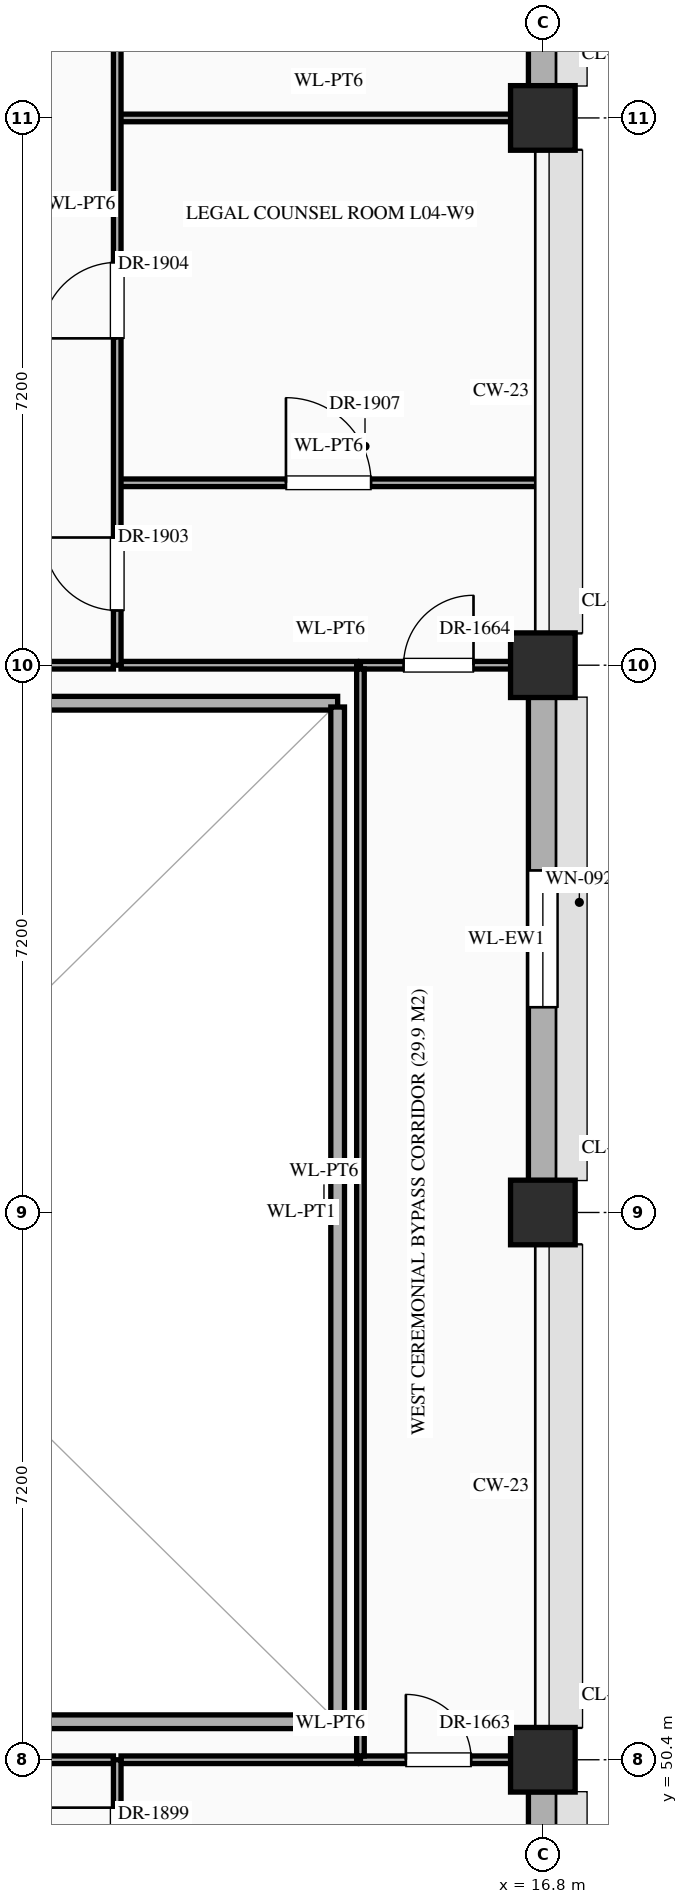
"""IFC4 building model, lengths in metres.
Left out: names, types, materials, properties, quantities, classifications, styles, units other than length and angle.
Written with IfcOpenShell. Run it as: python <this file> out.ifc"""

import sys

from ifc_helpers import new_model, si_unit, direction, frame, frame_2d, origin, origin_2d, place, context, subcontext, project, spatial, rectangle, extrude, element, fill, save


model = new_model("IFC4")
c1 = context("Model", 3, precision=1e-05, world=origin(), true_north=direction((0.0, 1.0)))
c2 = subcontext(c1, "Body", "Model", "MODEL_VIEW")
j1 = project(units=[si_unit("LENGTHUNIT", "METRE"), si_unit("PLANEANGLEUNIT", "RADIAN")], contexts=[c1])
p1 = place(None, origin())
s1 = spatial("IfcSite", under=j1, at=p1, CompositionType="ELEMENT")
p2 = place(p1, origin())
s2 = spatial("IfcBuilding", under=s1, at=p2, CompositionType="ELEMENT")
p3 = place(p2, frame((0.0, 0.0, 16.2)))
s3 = spatial("IfcBuildingStorey", under=s2, at=p3, CompositionType="ELEMENT", Elevation=16.2)
for number, where, z_axis, x_axis in (
    (1, (16.8, 50.4, 0.0), (0.0, 0.0, 1.0), (1.0, 0.0, 0.0)),
    (2, (16.8, 57.6, 0.0), (0.0, 0.0, 1.0), (1.0, 0.0, 0.0)),
    (3, (16.8, 64.8, 0.0), (0.0, 0.0, 1.0), (1.0, 0.0, 0.0)),
    (4, (16.8, 72.0, 0.0), (0.0, 0.0, 1.0), (1.0, 0.0, 0.0)),
):
    element("IfcColumn", number, at=place(p3, frame(where, z_axis=z_axis, x_axis=x_axis)), inside=s3, PredefinedType="COLUMN", context=c2, shape_type="SweptSolid", body=[
        extrude(rectangle(XDim=0.85, YDim=0.85, at=origin_2d()), origin(), (0.0, 0.0, 1.0), 5.4),
    ])
p4 = place(p3, frame((16.8, 43.62, 0.0), z_axis=(0.0, 0.0, 1.0), x_axis=(0.0, 1.0, 0.0)))
e5 = element("IfcWall", 5, at=p4, inside=s3, PredefinedType="STANDARD", context=c2, shape_type="SweptSolid", body=[
    extrude(rectangle(XDim=6.36, YDim=0.38, at=frame_2d((3.18, 0.0))), origin(), (0.0, 0.0, 1.0), 4.55),
])
p5 = place(p4, frame((2.405, 0.0, 0.85)))
e6 = element("IfcOpeningElement", 6, at=p5, cuts=e5, PredefinedType="OPENING", context=c2, shape_type="SweptSolid", body=[
    extrude(rectangle(XDim=1.55, YDim=1.92, at=frame_2d((0.775, 0.96))), frame((0.0, 0.202, 0.0), z_axis=(0.0, -1.0, 0.0), x_axis=(1.0, 0.0, 0.0)), (0.0, 0.0, 1.0), 0.404),
])
p6 = place(p3, frame((16.8, 58.02, 0.0), z_axis=(0.0, 0.0, 1.0), x_axis=(0.0, 1.0, 0.0)))
e7 = element("IfcWall", 7, at=p6, inside=s3, PredefinedType="STANDARD", context=c2, shape_type="SweptSolid", body=[
    extrude(rectangle(XDim=6.36, YDim=0.38, at=frame_2d((3.18, 0.0))), origin(), (0.0, 0.0, 1.0), 4.55),
])
p7 = place(p6, frame((2.28, 0.0, 0.85)))
e8 = element("IfcOpeningElement", 8, at=p7, cuts=e7, PredefinedType="OPENING", context=c2, shape_type="SweptSolid", body=[
    extrude(rectangle(XDim=1.8, YDim=1.2, at=frame_2d((0.9, 0.6))), frame((0.0, 0.202, 0.0), z_axis=(0.0, -1.0, 0.0), x_axis=(1.0, 0.0, 0.0)), (0.0, 0.0, 1.0), 0.404),
])
p8 = place(p3, frame((16.8, 72.42, 0.0), z_axis=(0.0, 0.0, 1.0), x_axis=(0.0, 1.0, 0.0)))
e9 = element("IfcWall", 9, at=p8, inside=s3, PredefinedType="STANDARD", context=c2, shape_type="SweptSolid", body=[
    extrude(rectangle(XDim=6.36, YDim=0.38, at=frame_2d((3.18, 0.0))), origin(), (0.0, 0.0, 1.0), 4.55),
])
p9 = place(p8, frame((2.28, 0.0, 0.85)))
e10 = element("IfcOpeningElement", 10, at=p9, cuts=e9, PredefinedType="OPENING", context=c2, shape_type="SweptSolid", body=[
    extrude(rectangle(XDim=1.8, YDim=1.56, at=frame_2d((0.9, 0.78))), frame((0.0, 0.202, 0.0), z_axis=(0.0, -1.0, 0.0), x_axis=(1.0, 0.0, 0.0)), (0.0, 0.0, 1.0), 0.404),
])
p10 = place(p3, frame((8.45, 50.4, 0.0), z_axis=(0.0, 0.0, 1.0), x_axis=(1.0, 0.0, 0.0)))
e11 = element("IfcWall", 11, at=p10, inside=s3, PredefinedType="STANDARD", context=c2, shape_type="SweptSolid", body=[
    extrude(rectangle(XDim=2.7, YDim=0.1, at=frame_2d((1.35, 0.0))), origin(), (0.0, 0.0, 1.0), 4.15),
])
p11 = place(p3, frame((11.25, 50.4, 0.0), z_axis=(0.0, 0.0, 1.0), x_axis=(1.0, 0.0, 0.0)))
e12 = element("IfcWall", 12, at=p11, inside=s3, PredefinedType="STANDARD", context=c2, shape_type="SweptSolid", body=[
    extrude(rectangle(XDim=3.1, YDim=0.1, at=frame_2d((1.55, 0.0))), origin(), (0.0, 0.0, 1.0), 4.15),
])
p12 = place(p3, frame((14.4, 50.4, 0.0), z_axis=(0.0, 0.0, 1.0), x_axis=(1.0, 0.0, 0.0)))
e13 = element("IfcWall", 13, at=p12, inside=s3, PredefinedType="STANDARD", context=c2, shape_type="SweptSolid", body=[
    extrude(rectangle(XDim=2.36, YDim=0.1, at=frame_2d((1.18, 0.0))), origin(), (0.0, 0.0, 1.0), 4.15),
])
p13 = place(p12, frame((0.597, 0.0, 0.0)))
e14 = element("IfcOpeningElement", 14, at=p13, cuts=e13, PredefinedType="OPENING", context=c2, shape_type="SweptSolid", body=[
    extrude(rectangle(XDim=0.86, YDim=2.1, at=frame_2d((0.43, 1.05))), frame((0.0, 0.062, 0.0), z_axis=(0.0, -1.0, 0.0), x_axis=(1.0, 0.0, 0.0)), (0.0, 0.0, 1.0), 0.124),
])
for number, where, z_axis, x_axis in (
    (15, (0.5, 50.9, 0.0), (0.0, 0.0, 1.0), (1.0, 0.0, 0.0)),
    (16, (0.5, 64.3, 0.0), (0.0, 0.0, 1.0), (1.0, 0.0, 0.0)),
):
    element("IfcWall", number, at=place(p3, frame(where, z_axis=z_axis, x_axis=x_axis)), inside=s3, PredefinedType="STANDARD", context=c2, shape_type="SweptSolid", body=[
        extrude(rectangle(XDim=13.6, YDim=0.18, at=frame_2d((6.8, 0.0))), origin(), (0.0, 0.0, 1.0), 5.2),
    ])
p14 = place(p3, frame((8.45, 64.8, 0.0), z_axis=(0.0, 0.0, 1.0), x_axis=(1.0, 0.0, 0.0)))
e17 = element("IfcWall", 17, at=p14, inside=s3, PredefinedType="STANDARD", context=c2, shape_type="SweptSolid", body=[
    extrude(rectangle(XDim=2.7, YDim=0.1, at=frame_2d((1.35, 0.0))), origin(), (0.0, 0.0, 1.0), 4.15),
])
p15 = place(p3, frame((11.25, 64.8, 0.0), z_axis=(0.0, 0.0, 1.0), x_axis=(1.0, 0.0, 0.0)))
e18 = element("IfcWall", 18, at=p15, inside=s3, PredefinedType="STANDARD", context=c2, shape_type="SweptSolid", body=[
    extrude(rectangle(XDim=3.1, YDim=0.1, at=frame_2d((1.55, 0.0))), origin(), (0.0, 0.0, 1.0), 4.15),
])
p16 = place(p3, frame((14.4, 64.8, 0.0), z_axis=(0.0, 0.0, 1.0), x_axis=(1.0, 0.0, 0.0)))
e19 = element("IfcWall", 19, at=p16, inside=s3, PredefinedType="STANDARD", context=c2, shape_type="SweptSolid", body=[
    extrude(rectangle(XDim=2.36, YDim=0.1, at=frame_2d((1.18, 0.0))), origin(), (0.0, 0.0, 1.0), 4.15),
])
p17 = place(p16, frame((0.567, 0.0, 0.0)))
e20 = element("IfcOpeningElement", 20, at=p17, cuts=e19, PredefinedType="OPENING", context=c2, shape_type="SweptSolid", body=[
    extrude(rectangle(XDim=0.92, YDim=2.15, at=frame_2d((0.46, 1.075))), frame((0.0, 0.062, 0.0), z_axis=(0.0, -1.0, 0.0), x_axis=(1.0, 0.0, 0.0)), (0.0, 0.0, 1.0), 0.124),
])
p18 = place(p3, frame((11.2, 67.2, 0.0), z_axis=(0.0, 0.0, 1.0), x_axis=(1.0, 0.0, 0.0)))
e21 = element("IfcWall", 21, at=p18, inside=s3, PredefinedType="STANDARD", context=c2, shape_type="SweptSolid", body=[
    extrude(rectangle(XDim=5.56, YDim=0.1, at=frame_2d((2.78, 0.0))), origin(), (0.0, 0.0, 1.0), 5.2),
])
p19 = place(p18, frame((2.22, 0.0, 0.0)))
e22 = element("IfcOpeningElement", 22, at=p19, cuts=e21, PredefinedType="OPENING", context=c2, shape_type="SweptSolid", body=[
    extrude(rectangle(XDim=1.12, YDim=2.25, at=frame_2d((0.56, 1.125))), frame((0.0, 0.062, 0.0), z_axis=(0.0, -1.0, 0.0), x_axis=(1.0, 0.0, 0.0)), (0.0, 0.0, 1.0), 0.124),
])
p20 = place(p3, frame((11.2, 72.0, 0.0), z_axis=(0.0, 0.0, 1.0), x_axis=(1.0, 0.0, 0.0)))
e23 = element("IfcWall", 23, at=p20, inside=s3, PredefinedType="STANDARD", context=c2, shape_type="SweptSolid", body=[
    extrude(rectangle(XDim=5.56, YDim=0.1, at=frame_2d((2.78, 0.0))), origin(), (0.0, 0.0, 1.0), 4.15),
])
p21 = place(p3, frame((11.2, 43.2, 0.0), z_axis=(0.0, 0.0, 1.0), x_axis=(0.0, 1.0, 0.0)))
e24 = element("IfcWall", 24, at=p21, inside=s3, PredefinedType="STANDARD", context=c2, shape_type="SweptSolid", body=[
    extrude(rectangle(XDim=7.2, YDim=0.1, at=frame_2d((3.6, 0.0))), origin(), (0.0, 0.0, 1.0), 5.2),
])
p22 = place(p21, frame((5.43, 0.0, 0.0)))
e25 = element("IfcOpeningElement", 25, at=p22, cuts=e24, PredefinedType="OPENING", context=c2, shape_type="SweptSolid", body=[
    extrude(rectangle(XDim=1.14, YDim=2.4, at=frame_2d((0.57, 1.2))), frame((0.0, 0.062, 0.0), z_axis=(0.0, -1.0, 0.0), x_axis=(1.0, 0.0, 0.0)), (0.0, 0.0, 1.0), 0.124),
])
p23 = place(p21, frame((1.95, 0.0, 0.0)))
e26 = element("IfcOpeningElement", 26, at=p23, cuts=e24, PredefinedType="OPENING", context=c2, shape_type="SweptSolid", body=[
    extrude(rectangle(XDim=0.9, YDim=2.15, at=frame_2d((0.45, 1.075))), frame((0.0, 0.062, 0.0), z_axis=(0.0, -1.0, 0.0), x_axis=(1.0, 0.0, 0.0)), (0.0, 0.0, 1.0), 0.124),
])
p24 = place(p3, frame((11.2, 64.8, 0.0), z_axis=(0.0, 0.0, 1.0), x_axis=(0.0, 1.0, 0.0)))
e27 = element("IfcWall", 27, at=p24, inside=s3, PredefinedType="STANDARD", context=c2, shape_type="SweptSolid", body=[
    extrude(rectangle(XDim=19.2, YDim=0.1, at=frame_2d((9.6, 0.0))), origin(), (0.0, 0.0, 1.0), 5.2),
])
p25 = place(p24, frame((16.16, 0.0, 0.0)))
e28 = element("IfcOpeningElement", 28, at=p25, cuts=e27, PredefinedType="OPENING", context=c2, shape_type="SweptSolid", body=[
    extrude(rectangle(XDim=1.28, YDim=2.35, at=frame_2d((0.64, 1.175))), frame((0.0, 0.062, 0.0), z_axis=(0.0, -1.0, 0.0), x_axis=(1.0, 0.0, 0.0)), (0.0, 0.0, 1.0), 0.124),
])
p26 = place(p24, frame((0.72, 0.0, 0.0)))
e29 = element("IfcOpeningElement", 29, at=p26, cuts=e27, PredefinedType="OPENING", context=c2, shape_type="SweptSolid", body=[
    extrude(rectangle(XDim=0.96, YDim=2.2, at=frame_2d((0.48, 1.1))), frame((0.0, 0.062, 0.0), z_axis=(0.0, -1.0, 0.0), x_axis=(1.0, 0.0, 0.0)), (0.0, 0.0, 1.0), 0.124),
])
p27 = place(p24, frame((4.3, 0.0, 0.0)))
e30 = element("IfcOpeningElement", 30, at=p27, cuts=e27, PredefinedType="OPENING", context=c2, shape_type="SweptSolid", body=[
    extrude(rectangle(XDim=1.0, YDim=2.25, at=frame_2d((0.5, 1.125))), frame((0.0, 0.062, 0.0), z_axis=(0.0, -1.0, 0.0), x_axis=(1.0, 0.0, 0.0)), (0.0, 0.0, 1.0), 0.124),
])
p28 = place(p24, frame((10.28, 0.0, 0.0)))
e31 = element("IfcOpeningElement", 31, at=p28, cuts=e27, PredefinedType="OPENING", context=c2, shape_type="SweptSolid", body=[
    extrude(rectangle(XDim=1.04, YDim=2.2, at=frame_2d((0.52, 1.1))), frame((0.0, 0.062, 0.0), z_axis=(0.0, -1.0, 0.0), x_axis=(1.0, 0.0, 0.0)), (0.0, 0.0, 1.0), 0.124),
])
p29 = place(p3, frame((14.1, 50.95, 0.0), z_axis=(0.0, 0.0, 1.0), x_axis=(0.0, 1.0, 0.0)))
e32 = element("IfcWall", 32, at=p29, inside=s3, PredefinedType="STANDARD", context=c2, shape_type="SweptSolid", body=[
    extrude(rectangle(XDim=13.3, YDim=0.18, at=frame_2d((6.65, 0.0))), origin(), (0.0, 0.0, 1.0), 5.2),
])
p30 = place(p3, frame((14.4, 50.45, 0.0), z_axis=(0.0, 0.0, 1.0), x_axis=(0.0, 1.0, 0.0)))
e33 = element("IfcWall", 33, at=p30, inside=s3, PredefinedType="STANDARD", context=c2, shape_type="SweptSolid", body=[
    extrude(rectangle(XDim=14.3, YDim=0.1, at=frame_2d((7.15, 0.0))), origin(), (0.0, 0.0, 1.0), 5.2),
])
p31 = place(p7, origin())
e34 = element("IfcWindow", 34, at=p31, inside=s3, PartitioningType="SINGLE_PANEL", PredefinedType="WINDOW", context=c2, shape_type="SweptSolid", body=[
    extrude(rectangle(XDim=1.8, YDim=1.2, at=frame_2d((0.9, 0.6))), frame((0.0, 0.03, 0.0), z_axis=(0.0, -1.0, 0.0), x_axis=(1.0, 0.0, 0.0)), (0.0, 0.0, 1.0), 0.06),
])
fill(e8, e34)
p32 = place(p13, origin())
e35 = element("IfcDoor", 35, at=p32, inside=s3, OperationType="SINGLE_SWING_LEFT", PredefinedType="DOOR", context=c2, shape_type="SweptSolid", body=[
    extrude(rectangle(XDim=0.86, YDim=2.1, at=frame_2d((0.43, 1.05))), frame((0.0, 0.025, 0.0), z_axis=(0.0, -1.0, 0.0), x_axis=(1.0, 0.0, 0.0)), (0.0, 0.0, 1.0), 0.05),
])
fill(e14, e35)
p33 = place(p17, origin())
e36 = element("IfcDoor", 36, at=p33, inside=s3, OperationType="SINGLE_SWING_RIGHT", PredefinedType="DOOR", context=c2, shape_type="SweptSolid", body=[
    extrude(rectangle(XDim=0.92, YDim=2.15, at=frame_2d((0.46, 1.075))), frame((0.0, 0.025, 0.0), z_axis=(0.0, -1.0, 0.0), x_axis=(1.0, 0.0, 0.0)), (0.0, 0.0, 1.0), 0.05),
])
fill(e20, e36)
p34 = place(p22, origin())
e37 = element("IfcDoor", 37, at=p34, inside=s3, OperationType="SINGLE_SWING_RIGHT", PredefinedType="DOOR", context=c2, shape_type="SweptSolid", body=[
    extrude(rectangle(XDim=1.14, YDim=2.4, at=frame_2d((0.57, 1.2))), frame((0.0, 0.025, 0.0), z_axis=(0.0, -1.0, 0.0), x_axis=(1.0, 0.0, 0.0)), (0.0, 0.0, 1.0), 0.05),
])
fill(e25, e37)
p35 = place(p26, origin())
e38 = element("IfcDoor", 38, at=p35, inside=s3, OperationType="SINGLE_SWING_RIGHT", PredefinedType="DOOR", context=c2, shape_type="SweptSolid", body=[
    extrude(rectangle(XDim=0.96, YDim=2.2, at=frame_2d((0.48, 1.1))), frame((0.0, 0.025, 0.0), z_axis=(0.0, -1.0, 0.0), x_axis=(1.0, 0.0, 0.0)), (0.0, 0.0, 1.0), 0.05),
])
fill(e29, e38)
p36 = place(p27, origin())
e39 = element("IfcDoor", 39, at=p36, inside=s3, OperationType="SINGLE_SWING_LEFT", PredefinedType="DOOR", context=c2, shape_type="SweptSolid", body=[
    extrude(rectangle(XDim=1.0, YDim=2.25, at=frame_2d((0.5, 1.125))), frame((0.0, 0.025, 0.0), z_axis=(0.0, -1.0, 0.0), x_axis=(1.0, 0.0, 0.0)), (0.0, 0.0, 1.0), 0.05),
])
fill(e30, e39)
p37 = place(p19, origin())
e40 = element("IfcDoor", 40, at=p37, inside=s3, OperationType="SINGLE_SWING_LEFT", PredefinedType="DOOR", context=c2, shape_type="SweptSolid", body=[
    extrude(rectangle(XDim=1.12, YDim=2.25, at=frame_2d((0.56, 1.125))), frame((0.0, 0.025, 0.0), z_axis=(0.0, -1.0, 0.0), x_axis=(1.0, 0.0, 0.0)), (0.0, 0.0, 1.0), 0.05),
])
fill(e22, e40)
save(model, sys.argv[1])
